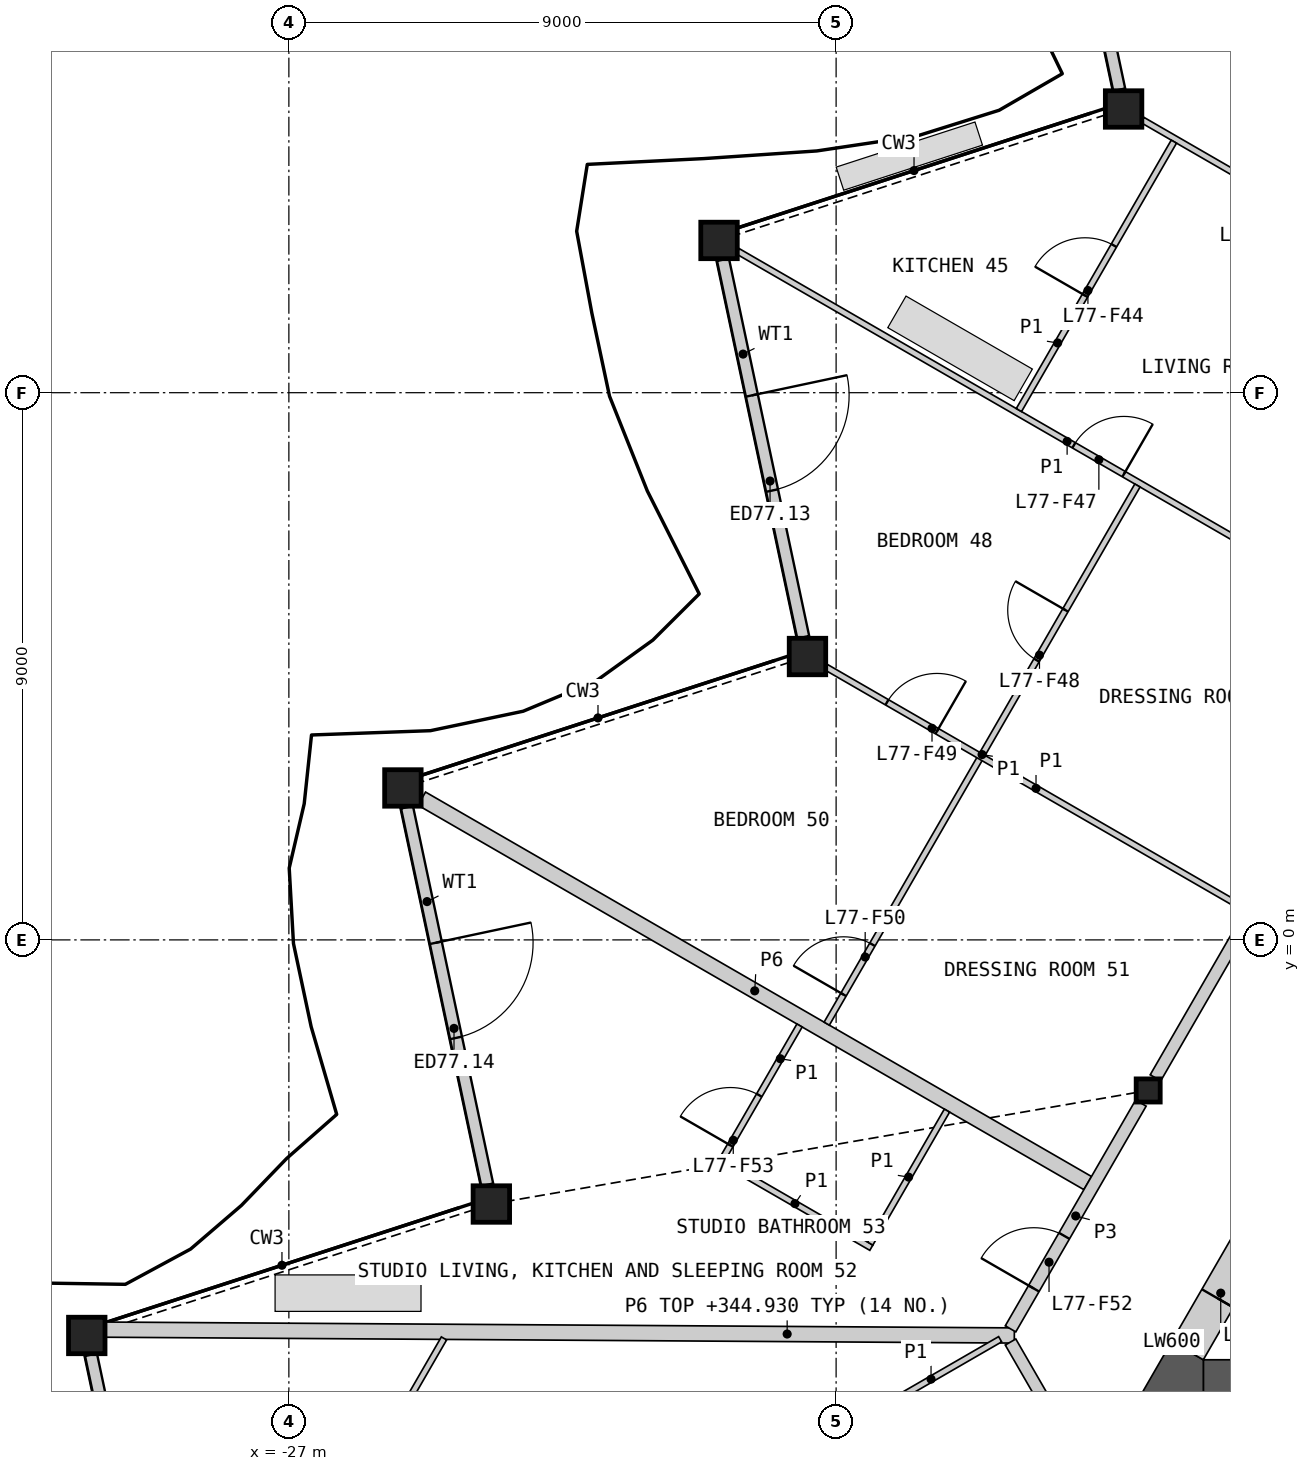
"""IFC4 building model, lengths in metres.
Left out: names, types, materials, properties, quantities, classifications, styles, units other than length and angle.
Written with IfcOpenShell. Run it as: python <this file> out.ifc"""

import sys

from ifc_helpers import new_model, si_unit, direction, frame, frame_2d, origin, origin_2d, place, context, subcontext, project, spatial, polyline, rectangle, hollow_rectangle, i_section, outline, extrude, element, fill, save


model = new_model("IFC4")
c1 = context("Model", 3, precision=1e-05, world=origin(), true_north=direction((0.0, 1.0)))
c2 = subcontext(c1, "Body", "Model", "MODEL_VIEW")
j1 = project(units=[si_unit("LENGTHUNIT", "METRE"), si_unit("PLANEANGLEUNIT", "RADIAN")], contexts=[c1])
p1 = place(None, origin())
s1 = spatial("IfcSite", under=j1, at=p1, CompositionType="ELEMENT")
p2 = place(p1, origin())
s2 = spatial("IfcBuilding", under=s1, at=p2, CompositionType="ELEMENT")
p3 = place(p2, frame((0.0, 0.0, 342.6)))
s3 = spatial("IfcBuildingStorey", under=s2, at=p3, CompositionType="ELEMENT", Elevation=342.6)
for number, where, z_axis, x_axis in (
    (1, (-13.272, 13.666, 0.0), (0.0, 0.0, 1.0), (1.0, 0.0, 0.0)),
    (2, (-19.926, 11.504, 0.0), (0.0, 0.0, 1.0), (1.0, 0.0, 0.0)),
    (3, (-18.471, 4.661, 0.0), (0.0, 0.0, 1.0), (1.0, 0.0, 0.0)),
    (4, (-25.125, 2.499, 0.0), (0.0, 0.0, 1.0), (1.0, 0.0, 0.0)),
    (5, (-23.67, -4.344, 0.0), (0.0, 0.0, 1.0), (1.0, 0.0, 0.0)),
    (6, (-30.324, -6.506, 0.0), (0.0, 0.0, 1.0), (1.0, 0.0, 0.0)),
):
    element("IfcColumn", number, at=place(p3, frame(where, z_axis=z_axis, x_axis=x_axis)), inside=s3, PredefinedType="COLUMN", context=c2, shape_type="SweptSolid", body=[
        extrude(hollow_rectangle(XDim=0.6, YDim=0.6, WallThickness=0.04, at=origin_2d()), origin(), (0.0, 0.0, 1.0), 3.4),
    ])
p4 = place(p3, frame((-12.868, -2.476, 0.0), z_axis=(0.0, 0.0, 1.0), x_axis=(1.0, 0.0, 0.0)))
e7 = element("IfcColumn", 7, at=p4, inside=s3, PredefinedType="COLUMN", context=c2, shape_type="SweptSolid", body=[
    extrude(i_section(OverallWidth=0.396, OverallDepth=0.381, WebThickness=0.019, FlangeThickness=0.03, at=origin_2d()), origin(), (0.0, 0.0, 1.0), 3.4),
])
p5 = place(p3, frame((-14.663, 20.192, 0.0), z_axis=(0.0, 0.0, 1.0), x_axis=(0.207897850695, -0.97815054244, 0.0)))
e8 = element("IfcWall", 8, at=p5, inside=s3, PredefinedType="SOLIDWALL", context=c2, shape_type="SweptSolid", body=[
    extrude(rectangle(XDim=6.348, YDim=0.2, at=frame_2d((3.174, 0.0))), origin(), (0.0, 0.0, 1.0), 2.488),
])
p6 = place(p5, frame((2.285, 0.0, 0.0)))
e9 = element("IfcOpeningElement", 9, at=p6, cuts=e8, PredefinedType="OPENING", context=c2, shape_type="SweptSolid", body=[
    extrude(rectangle(XDim=1.6, YDim=2.25, at=frame_2d((0.8, 1.125))), frame((0.0, 0.11, 0.0), z_axis=(0.0, -1.0, 0.0), x_axis=(1.0, 0.0, 0.0)), (0.0, 0.0, 1.0), 0.22),
])
p7 = place(p3, frame((-19.86, 11.188, 0.0), z_axis=(0.0, 0.0, 1.0), x_axis=(0.20789003057, -0.978152204511, 0.0)))
e10 = element("IfcWall", 10, at=p7, inside=s3, PredefinedType="SOLIDWALL", context=c2, shape_type="SweptSolid", body=[
    extrude(rectangle(XDim=6.349, YDim=0.2, at=frame_2d((3.174, 0.0))), origin(), (0.0, 0.0, 1.0), 2.488),
])
p8 = place(p7, frame((2.282, 0.0, 0.0)))
e11 = element("IfcOpeningElement", 11, at=p8, cuts=e10, PredefinedType="OPENING", context=c2, shape_type="SweptSolid", body=[
    extrude(rectangle(XDim=1.6, YDim=2.25, at=frame_2d((0.8, 1.125))), frame((0.0, 0.11, 0.0), z_axis=(0.0, -1.0, 0.0), x_axis=(1.0, 0.0, 0.0)), (0.0, 0.0, 1.0), 0.22),
])
p9 = place(p3, frame((-25.057, 2.182, 0.0), z_axis=(0.0, 0.0, 1.0), x_axis=(0.207926823578, -0.978144384044, 0.0)))
e12 = element("IfcWall", 12, at=p9, inside=s3, PredefinedType="SOLIDWALL", context=c2, shape_type="SweptSolid", body=[
    extrude(rectangle(XDim=6.349, YDim=0.2, at=frame_2d((3.174, 0.0))), origin(), (0.0, 0.0, 1.0), 2.488),
])
p10 = place(p9, frame((2.279, 0.0, 0.0)))
e13 = element("IfcOpeningElement", 13, at=p10, cuts=e12, PredefinedType="OPENING", context=c2, shape_type="SweptSolid", body=[
    extrude(rectangle(XDim=1.6, YDim=2.25, at=frame_2d((0.8, 1.125))), frame((0.0, 0.11, 0.0), z_axis=(0.0, -1.0, 0.0), x_axis=(1.0, 0.0, 0.0)), (0.0, 0.0, 1.0), 0.22),
])
p11 = place(p3, frame((-30.254, -6.823, 0.0), z_axis=(0.0, 0.0, 1.0), x_axis=(0.207926823578, -0.978144384044, 0.0)))
e14 = element("IfcWall", 14, at=p11, inside=s3, PredefinedType="SOLIDWALL", context=c2, shape_type="SweptSolid", body=[
    extrude(rectangle(XDim=6.349, YDim=0.2, at=frame_2d((3.174, 0.0))), origin(), (0.0, 0.0, 1.0), 2.488),
])
p12 = place(p11, frame((2.276, 0.0, 0.0)))
e15 = element("IfcOpeningElement", 15, at=p12, cuts=e14, PredefinedType="OPENING", context=c2, shape_type="SweptSolid", body=[
    extrude(rectangle(XDim=1.6, YDim=2.25, at=frame_2d((0.8, 1.125))), frame((0.0, 0.11, 0.0), z_axis=(0.0, -1.0, 0.0), x_axis=(1.0, 0.0, 0.0)), (0.0, 0.0, 1.0), 0.22),
])
p13 = place(p3, frame((-11.961, -7.206, 0.0), z_axis=(0.0, 0.0, 1.0), x_axis=(1.0, 0.0, 0.0)))
e16 = element("IfcWall", 16, at=p13, inside=s3, PredefinedType="SHEAR", context=c2, shape_type="SweptSolid", body=[
    extrude(rectangle(XDim=23.921, YDim=0.6, at=frame_2d((11.961, 0.0))), origin(), (0.0, 0.0, 1.0), 3.1),
])
p14 = place(p3, origin())
e17 = element("IfcWall", 17, at=p14, inside=s3, PredefinedType="SHEAR", context=c2, shape_type="SweptSolid", body=[
    extrude(outline(polyline([(-12.48, -6.606), (-11.961, -6.906), (-11.961, -7.506), (-13.0, -7.506), (-12.48, -6.606)])), origin(), (0.0, 0.0, 1.0), 3.1),
])
p15 = place(p3, frame((-10.925, -4.511, 0.0), z_axis=(0.0, 0.0, 1.0), x_axis=(-0.500018667571, -0.866014625789, 0.0)))
e18 = element("IfcWall", 18, at=p15, inside=s3, PredefinedType="SHEAR", context=c2, shape_type="SweptSolid", body=[
    extrude(rectangle(XDim=2.592, YDim=0.6, at=frame_2d((1.296, 0.0))), origin(), (0.0, 0.0, 1.0), 3.1),
])
p16 = place(p15, frame((0.6, 0.0, 0.0)))
e19 = element("IfcOpeningElement", 19, at=p16, cuts=e18, PredefinedType="OPENING", context=c2, shape_type="SweptSolid", body=[
    extrude(rectangle(XDim=1.0, YDim=2.1, at=frame_2d((0.5, 1.05))), frame((0.0, 0.31, 0.0), z_axis=(0.0, -1.0, 0.0), x_axis=(1.0, 0.0, 0.0)), (0.0, 0.0, 1.0), 0.62),
])
p17 = place(p3, frame((-30.014, -6.41, 0.0), z_axis=(0.0, 0.0, 1.0), x_axis=(0.999979286789, -0.00643630279, 0.0)))
e20 = element("IfcWall", 20, at=p17, inside=s3, PredefinedType="PARTITIONING", context=c2, shape_type="SweptSolid", body=[
    extrude(rectangle(XDim=14.945, YDim=0.25, at=frame_2d((7.473, 0.0))), origin(), (0.0, 0.0, 1.0), 2.33),
])
p18 = place(p3, frame((-24.815, 2.323, 0.0), z_axis=(0.0, 0.0, 1.0), x_axis=(0.866033203648, -0.499986489997, 0.0)))
e21 = element("IfcWall", 21, at=p18, inside=s3, PredefinedType="PARTITIONING", context=c2, shape_type="SweptSolid", body=[
    extrude(rectangle(XDim=12.646, YDim=0.25, at=frame_2d((6.323, 0.0))), origin(), (0.0, 0.0, 1.0), 2.33),
])
p19 = place(p3, frame((-12.748, -2.269, 0.0), z_axis=(0.0, 0.0, 1.0), x_axis=(0.499984266882, 0.866034487114, 0.0)))
e22 = element("IfcWall", 22, at=p19, inside=s3, PredefinedType="PARTITIONING", context=c2, shape_type="SweptSolid", body=[
    extrude(rectangle(XDim=8.099, YDim=0.2, at=frame_2d((4.049, 0.0))), origin(), (0.0, 0.0, 1.0), 3.1),
])
p20 = place(p3, frame((-15.131, -6.397, 0.0), z_axis=(0.0, 0.0, 1.0), x_axis=(0.500003406062, 0.866023437285, 0.0)))
e23 = element("IfcWall", 23, at=p20, inside=s3, PredefinedType="PARTITIONING", context=c2, shape_type="SweptSolid", body=[
    extrude(rectangle(XDim=4.288, YDim=0.2, at=frame_2d((2.144, 0.0))), origin(), (0.0, 0.0, 1.0), 3.1),
])
p21 = place(p20, frame((0.766, 0.0, 0.0)))
e24 = element("IfcOpeningElement", 24, at=p21, cuts=e23, PredefinedType="OPENING", context=c2, shape_type="SweptSolid", body=[
    extrude(rectangle(XDim=1.0, YDim=2.1, at=frame_2d((0.5, 1.05))), frame((0.0, 0.11, 0.0), z_axis=(0.0, -1.0, 0.0), x_axis=(1.0, 0.0, 0.0)), (0.0, 0.0, 1.0), 0.22),
])
p22 = place(p3, frame((-15.131, -6.614, 0.0), z_axis=(0.0, 0.0, 1.0), x_axis=(0.499967746641, -0.866044024469, 0.0)))
e25 = element("IfcWall", 25, at=p22, inside=s3, PredefinedType="PARTITIONING", context=c2, shape_type="SweptSolid", body=[
    extrude(rectangle(XDim=3.676, YDim=0.2, at=frame_2d((1.838, 0.0))), origin(), (0.0, 0.0, 1.0), 3.1),
])
p23 = place(p22, frame((2.426, 0.0, 0.0)))
e26 = element("IfcOpeningElement", 26, at=p23, cuts=e25, PredefinedType="OPENING", context=c2, shape_type="SweptSolid", body=[
    extrude(rectangle(XDim=1.0, YDim=2.1, at=frame_2d((0.5, 1.05))), frame((0.0, 0.11, 0.0), z_axis=(0.0, -1.0, 0.0), x_axis=(1.0, 0.0, 0.0)), (0.0, 0.0, 1.0), 0.22),
])
p24 = place(p3, frame((-19.615, 11.325, 0.0), z_axis=(0.0, 0.0, 1.0), x_axis=(0.86602139559, -0.500006942333, 0.0)))
e27 = element("IfcWall", 27, at=p24, inside=s3, PredefinedType="PARTITIONING", context=c2, shape_type="SweptSolid", body=[
    extrude(rectangle(XDim=12.505, YDim=0.1, at=frame_2d((6.252, 0.0))), origin(), (0.0, 0.0, 1.0), 2.33),
])
p25 = place(p24, frame((6.38, 0.0, 0.0)))
e28 = element("IfcOpeningElement", 28, at=p25, cuts=e27, PredefinedType="OPENING", context=c2, shape_type="SweptSolid", body=[
    extrude(rectangle(XDim=0.95, YDim=2.1, at=frame_2d((0.475, 1.05))), frame((0.0, 0.06, 0.0), z_axis=(0.0, -1.0, 0.0), x_axis=(1.0, 0.0, 0.0)), (0.0, 0.0, 1.0), 0.12),
])
p26 = place(p3, frame((-18.154, -1.377, 0.0), z_axis=(0.0, 0.0, 1.0), x_axis=(0.49998782916, 0.866032430508, 0.0)))
e29 = element("IfcWall", 29, at=p26, inside=s3, PredefinedType="PARTITIONING", context=c2, shape_type="SweptSolid", body=[
    extrude(rectangle(XDim=10.22, YDim=0.1, at=frame_2d((5.11, 0.0))), origin(), (0.0, 0.0, 1.0), 2.33),
])
p27 = place(p26, frame((6.903, 0.0, 0.0)))
e30 = element("IfcOpeningElement", 30, at=p27, cuts=e29, PredefinedType="OPENING", context=c2, shape_type="SweptSolid", body=[
    extrude(rectangle(XDim=0.95, YDim=2.1, at=frame_2d((0.475, 1.05))), frame((0.0, 0.06, 0.0), z_axis=(0.0, -1.0, 0.0), x_axis=(1.0, 0.0, 0.0)), (0.0, 0.0, 1.0), 0.12),
])
p28 = place(p26, frame((0.552, 0.0, 0.0)))
e31 = element("IfcOpeningElement", 31, at=p28, cuts=e29, PredefinedType="OPENING", context=c2, shape_type="SweptSolid", body=[
    extrude(rectangle(XDim=0.95, YDim=2.1, at=frame_2d((0.475, 1.05))), frame((0.0, 0.06, 0.0), z_axis=(0.0, -1.0, 0.0), x_axis=(1.0, 0.0, 0.0)), (0.0, 0.0, 1.0), 0.12),
])
p29 = place(p3, frame((-18.161, 4.484, 0.0), z_axis=(0.0, 0.0, 1.0), x_axis=(0.86602732995, -0.499996663769, 0.0)))
e32 = element("IfcWall", 32, at=p29, inside=s3, PredefinedType="PARTITIONING", context=c2, shape_type="SweptSolid", body=[
    extrude(rectangle(XDim=7.964, YDim=0.1, at=frame_2d((3.982, 0.0))), origin(), (0.0, 0.0, 1.0), 2.33),
])
p30 = place(p29, frame((1.152, 0.0, 0.0)))
e33 = element("IfcOpeningElement", 33, at=p30, cuts=e32, PredefinedType="OPENING", context=c2, shape_type="SweptSolid", body=[
    extrude(rectangle(XDim=0.95, YDim=2.1, at=frame_2d((0.475, 1.05))), frame((0.0, 0.06, 0.0), z_axis=(0.0, -1.0, 0.0), x_axis=(1.0, 0.0, 0.0)), (0.0, 0.0, 1.0), 0.12),
])
p31 = place(p3, frame((-12.962, 13.485, 0.0), z_axis=(0.0, 0.0, 1.0), x_axis=(0.866021168401, -0.500007335828, 0.0)))
e34 = element("IfcWall", 34, at=p31, inside=s3, PredefinedType="PARTITIONING", context=c2, shape_type="SweptSolid", body=[
    extrude(rectangle(XDim=7.962, YDim=0.1, at=frame_2d((3.981, 0.0))), origin(), (0.0, 0.0, 1.0), 2.33),
])
p32 = place(p31, frame((2.154, 0.0, 0.0)))
e35 = element("IfcOpeningElement", 35, at=p32, cuts=e34, PredefinedType="OPENING", context=c2, shape_type="SweptSolid", body=[
    extrude(rectangle(XDim=0.95, YDim=2.1, at=frame_2d((0.475, 1.05))), frame((0.0, 0.06, 0.0), z_axis=(0.0, -1.0, 0.0), x_axis=(1.0, 0.0, 0.0)), (0.0, 0.0, 1.0), 0.12),
])
p33 = place(p3, frame((-14.994, 8.714, 0.0), z_axis=(0.0, 0.0, 1.0), x_axis=(0.500012659481, 0.866018094706, 0.0)))
e36 = element("IfcWall", 36, at=p33, inside=s3, PredefinedType="PARTITIONING", context=c2, shape_type="SweptSolid", body=[
    extrude(rectangle(XDim=5.097, YDim=0.1, at=frame_2d((2.549, 0.0))), origin(), (0.0, 0.0, 1.0), 2.33),
])
p34 = place(p33, frame((2.175, 0.0, 0.0)))
e37 = element("IfcOpeningElement", 37, at=p34, cuts=e36, PredefinedType="OPENING", context=c2, shape_type="SweptSolid", body=[
    extrude(rectangle(XDim=0.95, YDim=2.1, at=frame_2d((0.475, 1.05))), frame((0.0, 0.06, 0.0), z_axis=(0.0, -1.0, 0.0), x_axis=(1.0, 0.0, 0.0)), (0.0, 0.0, 1.0), 0.12),
])
p35 = place(p3, frame((-26.619, -10.312, 0.0), z_axis=(0.0, 0.0, 1.0), x_axis=(0.500060114735, 0.865990693744, 0.0)))
e38 = element("IfcWall", 38, at=p35, inside=s3, PredefinedType="PARTITIONING", context=c2, shape_type="SweptSolid", body=[
    extrude(rectangle(XDim=4.339, YDim=0.1, at=frame_2d((2.17, 0.0))), origin(), (0.0, 0.0, 1.0), 2.33),
])
p36 = place(p35, frame((0.663, 0.0, 0.0)))
e39 = element("IfcOpeningElement", 39, at=p36, cuts=e38, PredefinedType="OPENING", context=c2, shape_type="SweptSolid", body=[
    extrude(rectangle(XDim=0.95, YDim=2.1, at=frame_2d((0.475, 1.05))), frame((0.0, 0.06, 0.0), z_axis=(0.0, -1.0, 0.0), x_axis=(1.0, 0.0, 0.0)), (0.0, 0.0, 1.0), 0.12),
])
p37 = place(p3, frame((-19.932, -3.613, 0.0), z_axis=(0.0, 0.0, 1.0), x_axis=(0.865996321171, -0.50005036918, 0.0)))
e40 = element("IfcWall", 40, at=p37, inside=s3, PredefinedType="PARTITIONING", context=c2, shape_type="SweptSolid", body=[
    extrude(rectangle(XDim=2.9, YDim=0.1, at=frame_2d((1.45, 0.0))), origin(), (0.0, 0.0, 1.0), 2.33),
])
p38 = place(p3, frame((-17.439, -4.995, 0.0), z_axis=(0.0, 0.0, 1.0), x_axis=(0.499976333282, 0.866039067339, 0.0)))
e41 = element("IfcWall", 41, at=p38, inside=s3, PredefinedType="PARTITIONING", context=c2, shape_type="SweptSolid", body=[
    extrude(rectangle(XDim=2.525, YDim=0.1, at=frame_2d((1.262, 0.0))), origin(), (0.0, 0.0, 1.0), 2.33),
])
p39 = place(p3, frame((-19.864, -3.594, 0.0), z_axis=(0.0, 0.0, 1.0), x_axis=(0.50001820224, 0.866014894461, 0.0)))
e42 = element("IfcWall", 42, at=p39, inside=s3, PredefinedType="PARTITIONING", context=c2, shape_type="SweptSolid", body=[
    extrude(rectangle(XDim=2.525, YDim=0.1, at=frame_2d((1.262, 0.0))), origin(), (0.0, 0.0, 1.0), 2.33),
])
p40 = place(p39, frame((0.25, 0.0, 0.0)))
e43 = element("IfcOpeningElement", 43, at=p40, cuts=e42, PredefinedType="OPENING", context=c2, shape_type="SweptSolid", body=[
    extrude(rectangle(XDim=0.95, YDim=2.1, at=frame_2d((0.475, 1.05))), frame((0.0, 0.06, 0.0), z_axis=(0.0, -1.0, 0.0), x_axis=(1.0, 0.0, 0.0)), (0.0, 0.0, 1.0), 0.12),
])
p41 = place(p3, frame((-17.575, -7.881, 0.0), z_axis=(0.0, 0.0, 1.0), x_axis=(0.866013657776, 0.500020344131, 0.0)))
e44 = element("IfcWall", 44, at=p41, inside=s3, PredefinedType="PARTITIONING", context=c2, shape_type="SweptSolid", body=[
    extrude(rectangle(XDim=2.625, YDim=0.1, at=frame_2d((1.312, 0.0))), origin(), (0.0, 0.0, 1.0), 2.33),
])
p42 = place(p8, origin())
e45 = element("IfcDoor", 45, at=p42, inside=s3, OperationType="DOUBLE_DOOR_SINGLE_SWING", PredefinedType="DOOR", context=c2, shape_type="SweptSolid", body=[
    extrude(rectangle(XDim=1.6, YDim=2.25, at=frame_2d((0.8, 1.125))), frame((0.0, 0.025, 0.0), z_axis=(0.0, -1.0, 0.0), x_axis=(1.0, 0.0, 0.0)), (0.0, 0.0, 1.0), 0.05),
])
fill(e11, e45)
p43 = place(p10, origin())
e46 = element("IfcDoor", 46, at=p43, inside=s3, OperationType="DOUBLE_DOOR_SINGLE_SWING", PredefinedType="DOOR", context=c2, shape_type="SweptSolid", body=[
    extrude(rectangle(XDim=1.6, YDim=2.25, at=frame_2d((0.8, 1.125))), frame((0.0, 0.025, 0.0), z_axis=(0.0, -1.0, 0.0), x_axis=(1.0, 0.0, 0.0)), (0.0, 0.0, 1.0), 0.05),
])
fill(e13, e46)
p44 = place(p16, origin())
e47 = element("IfcDoor", 47, at=p44, inside=s3, OperationType="SINGLE_SWING_RIGHT", PredefinedType="DOOR", context=c2, shape_type="SweptSolid", body=[
    extrude(rectangle(XDim=1.0, YDim=2.1, at=frame_2d((0.5, 1.05))), frame((0.0, 0.055, 0.0), z_axis=(0.0, -1.0, 0.0), x_axis=(1.0, 0.0, 0.0)), (0.0, 0.0, 1.0), 0.05),
])
fill(e19, e47)
p45 = place(p34, origin())
e48 = element("IfcDoor", 48, at=p45, inside=s3, OperationType="SINGLE_SWING_LEFT", PredefinedType="DOOR", context=c2, shape_type="SweptSolid", body=[
    extrude(rectangle(XDim=0.95, YDim=2.1, at=frame_2d((0.475, 1.05))), frame((0.0, 0.025, 0.0), z_axis=(0.0, -1.0, 0.0), x_axis=(1.0, 0.0, 0.0)), (0.0, 0.0, 1.0), 0.05),
])
fill(e37, e48)
p46 = place(p25, origin())
e49 = element("IfcDoor", 49, at=p46, inside=s3, OperationType="SINGLE_SWING_RIGHT", PredefinedType="DOOR", context=c2, shape_type="SweptSolid", body=[
    extrude(rectangle(XDim=0.95, YDim=2.1, at=frame_2d((0.475, 1.05))), frame((0.0, 0.025, 0.0), z_axis=(0.0, -1.0, 0.0), x_axis=(1.0, 0.0, 0.0)), (0.0, 0.0, 1.0), 0.05),
])
fill(e28, e49)
p47 = place(p27, origin())
e50 = element("IfcDoor", 50, at=p47, inside=s3, OperationType="SINGLE_SWING_RIGHT", PredefinedType="DOOR", context=c2, shape_type="SweptSolid", body=[
    extrude(rectangle(XDim=0.95, YDim=2.1, at=frame_2d((0.475, 1.05))), frame((0.0, 0.025, 0.0), z_axis=(0.0, -1.0, 0.0), x_axis=(1.0, 0.0, 0.0)), (0.0, 0.0, 1.0), 0.05),
])
fill(e30, e50)
p48 = place(p30, origin())
e51 = element("IfcDoor", 51, at=p48, inside=s3, OperationType="SINGLE_SWING_RIGHT", PredefinedType="DOOR", context=c2, shape_type="SweptSolid", body=[
    extrude(rectangle(XDim=0.95, YDim=2.1, at=frame_2d((0.475, 1.05))), frame((0.0, 0.025, 0.0), z_axis=(0.0, -1.0, 0.0), x_axis=(1.0, 0.0, 0.0)), (0.0, 0.0, 1.0), 0.05),
])
fill(e33, e51)
p49 = place(p28, origin())
e52 = element("IfcDoor", 52, at=p49, inside=s3, OperationType="SINGLE_SWING_LEFT", PredefinedType="DOOR", context=c2, shape_type="SweptSolid", body=[
    extrude(rectangle(XDim=0.95, YDim=2.1, at=frame_2d((0.475, 1.05))), frame((0.0, 0.025, 0.0), z_axis=(0.0, -1.0, 0.0), x_axis=(1.0, 0.0, 0.0)), (0.0, 0.0, 1.0), 0.05),
])
fill(e31, e52)
p50 = place(p21, origin())
e53 = element("IfcDoor", 53, at=p50, inside=s3, OperationType="SINGLE_SWING_LEFT", PredefinedType="DOOR", context=c2, shape_type="SweptSolid", body=[
    extrude(rectangle(XDim=1.0, YDim=2.1, at=frame_2d((0.5, 1.05))), frame((0.0, 0.025, 0.0), z_axis=(0.0, -1.0, 0.0), x_axis=(1.0, 0.0, 0.0)), (0.0, 0.0, 1.0), 0.05),
])
fill(e24, e53)
p51 = place(p40, origin())
e54 = element("IfcDoor", 54, at=p51, inside=s3, OperationType="SINGLE_SWING_LEFT", PredefinedType="DOOR", context=c2, shape_type="SweptSolid", body=[
    extrude(rectangle(XDim=0.95, YDim=2.1, at=frame_2d((0.475, 1.05))), frame((0.0, 0.025, 0.0), z_axis=(0.0, -1.0, 0.0), x_axis=(1.0, 0.0, 0.0)), (0.0, 0.0, 1.0), 0.05),
])
fill(e43, e54)
save(model, sys.argv[1])
